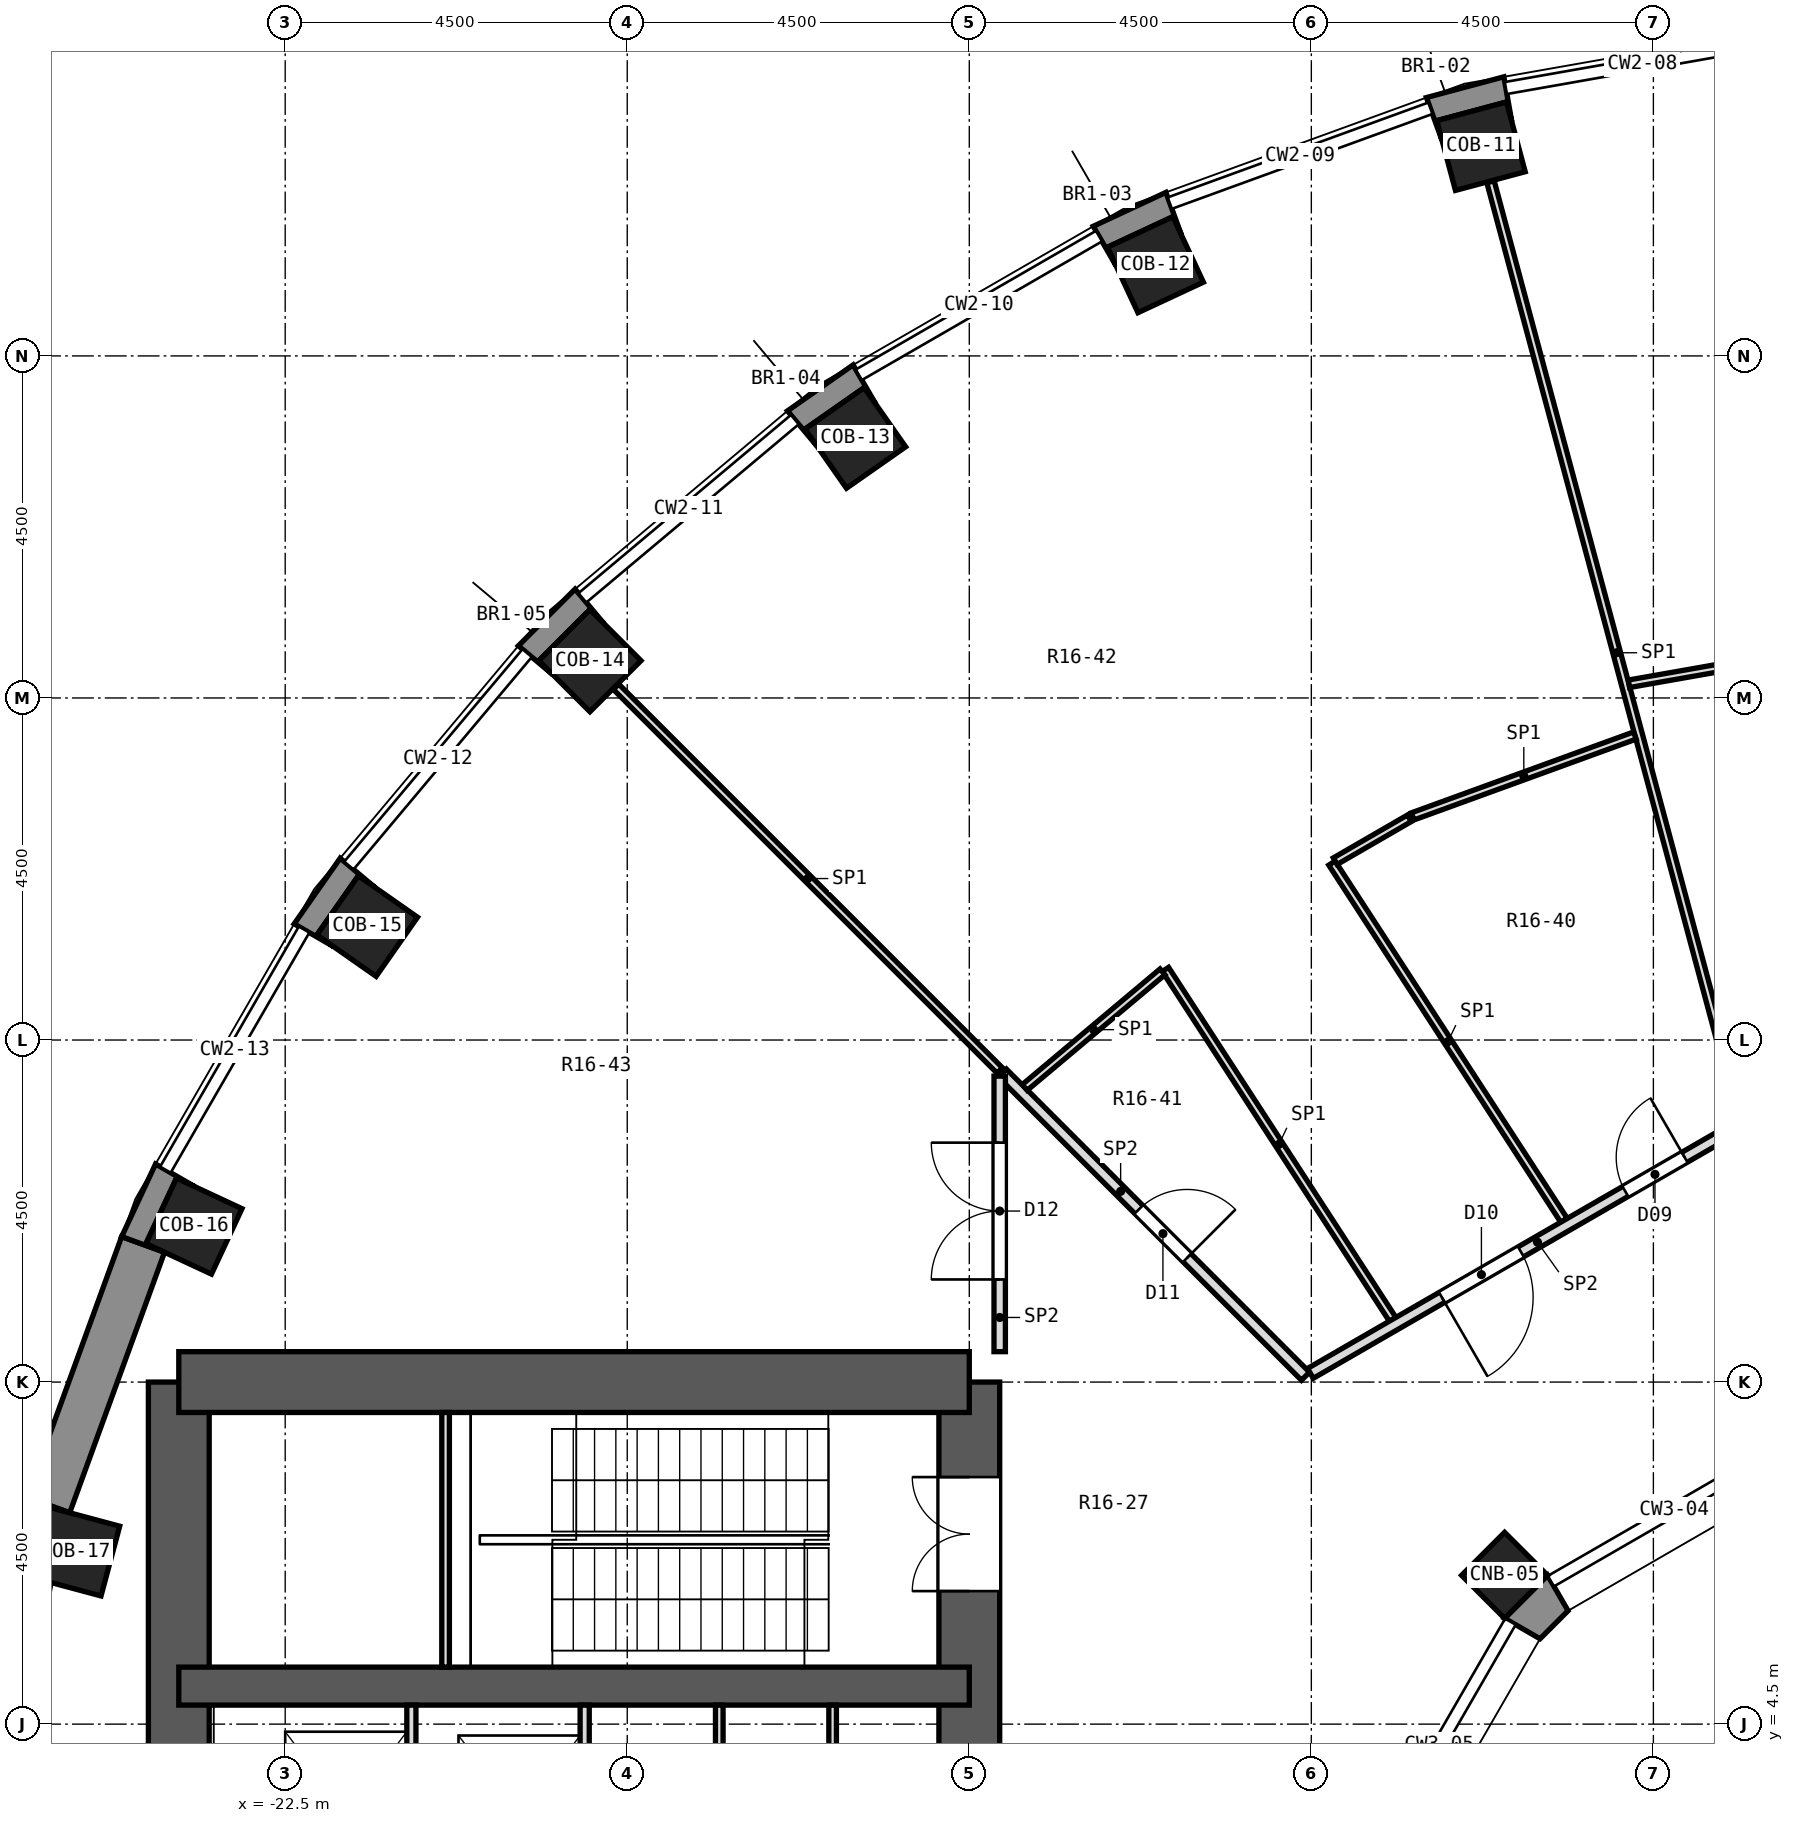
"""IFC4 building model, lengths in metres.
Left out: names, types, materials, properties, quantities, classifications, styles, units other than length and angle.
Written with IfcOpenShell. Run it as: python <this file> out.ifc"""

import sys

from ifc_helpers import new_model, si_unit, direction, frame, frame_2d, origin, origin_2d, place, context, subcontext, project, spatial, polyline, rectangle, outline, extrude, element, fill, save


model = new_model("IFC4")
c1 = context("Model", 3, precision=1e-05, world=origin(), true_north=direction((0.0, 1.0)))
c2 = subcontext(c1, "Body", "Model", "MODEL_VIEW")
j1 = project(units=[si_unit("LENGTHUNIT", "METRE"), si_unit("PLANEANGLEUNIT", "RADIAN")], contexts=[c1])
p1 = place(None, origin())
s1 = spatial("IfcSite", under=j1, at=p1, CompositionType="ELEMENT")
p2 = place(p1, origin())
s2 = spatial("IfcBuilding", under=s1, at=p2, CompositionType="ELEMENT")
p3 = place(p2, frame((0.0, 0.0, 86.9)))
s3 = spatial("IfcBuildingStorey", under=s2, at=p3, CompositionType="ELEMENT", Elevation=86.9)
for number, where, z_axis, x_axis in (
    (1, (-6.768, 25.259, -0.55), (0.0, 0.0, 1.0), (-0.259, 0.966, 0.0)),
    (2, (-11.052, 23.7, -0.55), (0.0, 0.0, 1.0), (-0.423, 0.906, 0.0)),
    (3, (-14.999, 21.421, -0.55), (0.0, 0.0, 1.0), (-0.574, 0.819, 0.0)),
    (4, (-18.491, 18.491, -0.55), (0.0, 0.0, 1.0), (-0.707, 0.707, 0.0)),
    (5, (-21.421, 14.999, -0.55), (0.0, 0.0, 1.0), (-0.819, 0.574, 0.0)),
    (6, (-23.7, 11.052, -0.55), (0.0, 0.0, 1.0), (-0.906, 0.423, 0.0)),
    (7, (-25.259, 6.768, -0.55), (0.0, 0.0, 1.0), (-0.966, 0.259, 0.0)),
):
    element("IfcColumn", number, at=place(p3, frame(where, z_axis=z_axis, x_axis=x_axis)), inside=s3, PredefinedType="COLUMN", context=c2, shape_type="SweptSolid", body=[
        extrude(rectangle(XDim=0.95, YDim=0.95, at=origin_2d()), origin(), (0.0, 0.0, 1.0), 5.55),
    ])
p4 = place(p3, frame((-6.458, 6.458, 0.0), z_axis=(0.0, 0.0, 1.0), x_axis=(-0.707106781187, 0.707106781187, 0.0)))
e8 = element("IfcColumn", 8, at=p4, inside=s3, PredefinedType="COLUMN", context=c2, shape_type="SweptSolid", body=[
    extrude(rectangle(XDim=0.8, YDim=0.8, at=origin_2d()), origin(), (0.0, 0.0, 1.0), 5.0),
])
p5 = place(p3, frame((-13.5, -9.0, 0.0), z_axis=(0.0, 0.0, 1.0), x_axis=(0.0, 1.0, 0.0)))
e9 = element("IfcWall", 9, at=p5, inside=s3, PredefinedType="SHEAR", context=c2, shape_type="SweptSolid", body=[
    extrude(rectangle(XDim=18.0, YDim=0.8, at=frame_2d((9.0, 0.0))), origin(), (0.0, 0.0, 1.0), 5.0),
])
p6 = place(p5, frame((15.25, 0.0, 0.0)))
e10 = element("IfcOpeningElement", 10, at=p6, cuts=e9, PredefinedType="OPENING", context=c2, shape_type="SweptSolid", body=[
    extrude(rectangle(XDim=1.5, YDim=2.1, at=frame_2d((0.75, 1.05))), frame((0.0, 0.412, 0.0), z_axis=(0.0, -1.0, 0.0), x_axis=(1.0, 0.0, 0.0)), (0.0, 0.0, 1.0), 0.824),
])
p7 = place(p5, frame((1.25, 0.0, 0.0)))
e11 = element("IfcOpeningElement", 11, at=p7, cuts=e9, PredefinedType="OPENING", context=c2, shape_type="SweptSolid", body=[
    extrude(rectangle(XDim=1.5, YDim=2.1, at=frame_2d((0.75, 1.05))), frame((0.0, 0.412, 0.0), z_axis=(0.0, -1.0, 0.0), x_axis=(1.0, 0.0, 0.0)), (0.0, 0.0, 1.0), 0.824),
])
p8 = place(p5, frame((7.5, 0.0, 0.0)))
e12 = element("IfcOpeningElement", 12, at=p8, cuts=e9, PredefinedType="OPENING", context=c2, shape_type="SweptSolid", body=[
    extrude(rectangle(XDim=3.0, YDim=2.4, at=frame_2d((1.5, 1.2))), frame((0.0, 0.412, 0.0), z_axis=(0.0, -1.0, 0.0), x_axis=(1.0, 0.0, 0.0)), (0.0, 0.0, 1.0), 0.824),
])
p9 = place(p3, frame((-23.9, -9.0, 0.0), z_axis=(0.0, 0.0, 1.0), x_axis=(0.0, 1.0, 0.0)))
e13 = element("IfcWall", 13, at=p9, inside=s3, PredefinedType="SHEAR", context=c2, shape_type="SweptSolid", body=[
    extrude(rectangle(XDim=18.0, YDim=0.8, at=frame_2d((9.0, 0.0))), origin(), (0.0, 0.0, 1.0), 5.0),
])
p10 = place(p3, frame((-13.5, 9.0, 0.0), z_axis=(0.0, 0.0, 1.0), x_axis=(-1.0, 0.0, 0.0)))
e14 = element("IfcWall", 14, at=p10, inside=s3, PredefinedType="SHEAR", context=c2, shape_type="SweptSolid", body=[
    extrude(rectangle(XDim=10.4, YDim=0.8, at=frame_2d((5.2, 0.0))), origin(), (0.0, 0.0, 1.0), 5.0),
])
p11 = place(p3, frame((-13.5, 5.0, 0.0), z_axis=(0.0, 0.0, 1.0), x_axis=(-1.0, 0.0, 0.0)))
e15 = element("IfcWall", 15, at=p11, inside=s3, PredefinedType="SHEAR", context=c2, shape_type="SweptSolid", body=[
    extrude(rectangle(XDim=10.4, YDim=0.5, at=frame_2d((5.2, 0.0))), origin(), (0.0, 0.0, 1.0), 5.0),
])
p12 = place(p3, frame((-24.369, 10.811, 0.0), z_axis=(0.0, 0.0, 1.0), x_axis=(-0.341990236633, -0.939703505393, 0.0)))
e16 = element("IfcWall", 16, at=p12, inside=s3, PredefinedType="SOLIDWALL", context=c2, shape_type="SweptSolid", body=[
    extrude(rectangle(XDim=3.648, YDim=0.6, at=frame_2d((1.824, 0.0))), origin(), (0.0, 0.0, 1.0), 4.5),
])
p13 = place(p3, origin())
e17 = element("IfcWall", 17, at=p13, inside=s3, PredefinedType="SOLIDWALL", context=c2, shape_type="SweptSolid", body=[
    extrude(outline(polyline([(-6.467, 26.172), (-7.486, 25.899), (-7.28, 25.335), (-7.35, 25.595), (-6.432, 25.841), (-6.363, 25.581), (-6.467, 26.172)])), origin(), (0.0, 0.0, 1.0), 4.5),
])
p14 = place(p3, origin())
e18 = element("IfcWall", 18, at=p14, inside=s3, PredefinedType="SOLIDWALL", context=c2, shape_type="SweptSolid", body=[
    extrude(outline(polyline([(-10.913, 24.651), (-11.869, 24.206), (-11.569, 23.686), (-11.683, 23.93), (-10.822, 24.331), (-10.708, 24.087), (-10.913, 24.651)])), origin(), (0.0, 0.0, 1.0), 4.5),
])
p15 = place(p3, origin())
e19 = element("IfcWall", 19, at=p15, inside=s3, PredefinedType="SOLIDWALL", context=c2, shape_type="SweptSolid", body=[
    extrude(outline(polyline([(-15.892, 21.777), (-15.506, 21.317), (-15.661, 21.538), (-14.882, 22.083), (-14.728, 21.862), (-15.028, 22.382), (-15.892, 21.777)])), origin(), (0.0, 0.0, 1.0), 4.5),
])
p16 = place(p3, origin())
e20 = element("IfcWall", 20, at=p16, inside=s3, PredefinedType="SOLIDWALL", context=c2, shape_type="SweptSolid", body=[
    extrude(outline(polyline([(-18.686, 19.432), (-19.432, 18.686), (-18.972, 18.301), (-19.163, 18.491), (-18.491, 19.163), (-18.301, 18.972), (-18.686, 19.432)])), origin(), (0.0, 0.0, 1.0), 4.5),
])
p17 = place(p3, origin())
e21 = element("IfcWall", 21, at=p17, inside=s3, PredefinedType="SOLIDWALL", context=c2, shape_type="SweptSolid", body=[
    extrude(outline(polyline([(-22.382, 15.028), (-21.862, 14.728), (-22.083, 14.882), (-21.538, 15.661), (-21.317, 15.506), (-21.777, 15.892), (-22.382, 15.028)])), origin(), (0.0, 0.0, 1.0), 4.5),
])
p18 = place(p3, origin())
e22 = element("IfcWall", 22, at=p18, inside=s3, PredefinedType="SOLIDWALL", context=c2, shape_type="SweptSolid", body=[
    extrude(outline(polyline([(-24.651, 10.913), (-24.087, 10.708), (-24.331, 10.822), (-23.93, 11.683), (-23.686, 11.569), (-24.206, 11.869), (-24.651, 10.913)])), origin(), (0.0, 0.0, 1.0), 4.5),
])
p19 = place(p3, origin())
e23 = element("IfcWall", 23, at=p19, inside=s3, PredefinedType="SOLIDWALL", context=c2, shape_type="SweptSolid", body=[
    extrude(outline(polyline([(-25.899, 7.486), (-26.172, 6.467), (-25.581, 6.363), (-25.841, 6.432), (-25.595, 7.35), (-25.335, 7.28), (-25.899, 7.486)])), origin(), (0.0, 0.0, 1.0), 4.5),
])
p20 = place(p3, origin())
e24 = element("IfcWall", 24, at=p20, inside=s3, PredefinedType="SOLIDWALL", context=c2, shape_type="SweptSolid", body=[
    extrude(outline(polyline([(-6.458, 5.892), (-5.991, 5.623), (-5.623, 5.991), (-5.892, 6.458), (-6.458, 5.892)])), origin(), (0.0, 0.0, 1.0), 4.5),
])
p21 = place(p3, frame((-6.643, 24.791, 0.0), z_axis=(0.0, 0.0, 1.0), x_axis=(0.258784286108, -0.965935139263, 0.0)))
e25 = element("IfcWall", 25, at=p21, inside=s3, PredefinedType="PARTITIONING", context=c2, shape_type="SweptSolid", body=[
    extrude(rectangle(XDim=12.828, YDim=0.1, at=frame_2d((6.414, 0.0))), origin(), (0.0, 0.0, 1.0), 4.5),
])
p22 = place(p3, frame((-10.92, 14.429, 0.0), z_axis=(0.0, 0.0, 1.0), x_axis=(0.54460991282, -0.838689479401, 0.0)))
e26 = element("IfcWall", 26, at=p22, inside=s3, PredefinedType="PARTITIONING", context=c2, shape_type="SweptSolid", body=[
    extrude(rectangle(XDim=5.488, YDim=0.1, at=frame_2d((2.744, 0.0))), origin(), (0.0, 0.0, 1.0), 4.5),
])
p23 = place(p3, frame((-8.729, 15.828, 0.0), z_axis=(0.0, 0.0, 1.0), x_axis=(0.544769380459, -0.838585906222, 0.0)))
e27 = element("IfcWall", 27, at=p23, inside=s3, PredefinedType="PARTITIONING", context=c2, shape_type="SweptSolid", body=[
    extrude(rectangle(XDim=5.605, YDim=0.1, at=frame_2d((2.802, 0.0))), origin(), (0.0, 0.0, 1.0), 4.5),
])
p24 = place(p3, frame((-18.148, 18.148, 0.0), z_axis=(0.0, 0.0, 1.0), x_axis=(0.707106781187, -0.707106781187, 0.0)))
e28 = element("IfcWall", 28, at=p24, inside=s3, PredefinedType="PARTITIONING", context=c2, shape_type="SweptSolid", body=[
    extrude(rectangle(XDim=7.139, YDim=0.1, at=frame_2d((3.569, 0.0))), origin(), (0.0, 0.0, 1.0), 4.5),
])
p25 = place(p3, frame((-13.065, 13.065, 0.0), z_axis=(0.0, 0.0, 1.0), x_axis=(0.707106781187, -0.707106781187, 0.0)))
e29 = element("IfcWall", 29, at=p25, inside=s3, PredefinedType="PARTITIONING", context=c2, shape_type="SweptSolid", body=[
    extrude(rectangle(XDim=5.64, YDim=0.15, at=frame_2d((2.82, 0.0))), origin(), (0.0, 0.0, 1.0), 4.5),
])
p26 = place(p25, frame((2.537, 0.0, 0.0)))
e30 = element("IfcOpeningElement", 30, at=p26, cuts=e29, PredefinedType="OPENING", context=c2, shape_type="SweptSolid", body=[
    extrude(rectangle(XDim=0.9, YDim=2.1, at=frame_2d((0.45, 1.05))), frame((0.0, 0.087, 0.0), z_axis=(0.0, -1.0, 0.0), x_axis=(1.0, 0.0, 0.0)), (0.0, 0.0, 1.0), 0.174),
])
p27 = place(p3, frame((-4.822, 18.187, 0.0), z_axis=(0.0, 0.0, 1.0), x_axis=(0.984847393416, 0.173423215521, 0.0)))
e31 = element("IfcWall", 31, at=p27, inside=s3, PredefinedType="PARTITIONING", context=c2, shape_type="SweptSolid", body=[
    extrude(rectangle(XDim=3.231, YDim=0.1, at=frame_2d((1.615, 0.0))), origin(), (0.0, 0.0, 1.0), 4.5),
])
p28 = place(p3, frame((-7.667, 16.442, 0.0), z_axis=(0.0, 0.0, 1.0), x_axis=(0.93972467972, 0.34193204928, 0.0)))
e32 = element("IfcWall", 32, at=p28, inside=s3, PredefinedType="PARTITIONING", context=c2, shape_type="SweptSolid", body=[
    extrude(rectangle(XDim=3.112, YDim=0.1, at=frame_2d((1.556, 0.0))), origin(), (0.0, 0.0, 1.0), 4.5),
])
p29 = place(p3, frame((-9.012, 9.115, 0.0), z_axis=(0.0, 0.0, 1.0), x_axis=(0.865967095912, 0.5001009786, 0.0)))
e33 = element("IfcWall", 33, at=p29, inside=s3, PredefinedType="PARTITIONING", context=c2, shape_type="SweptSolid", body=[
    extrude(rectangle(XDim=6.495, YDim=0.15, at=frame_2d((3.248, 0.0))), origin(), (0.0, 0.0, 1.0), 4.5),
])
p30 = place(p29, frame((4.785, 0.0, 0.0)))
e34 = element("IfcOpeningElement", 34, at=p30, cuts=e33, PredefinedType="OPENING", context=c2, shape_type="SweptSolid", body=[
    extrude(rectangle(XDim=0.9, YDim=2.1, at=frame_2d((0.45, 1.05))), frame((0.0, 0.087, 0.0), z_axis=(0.0, -1.0, 0.0), x_axis=(1.0, 0.0, 0.0)), (0.0, 0.0, 1.0), 0.174),
])
p31 = place(p29, frame((1.998, 0.0, 0.0)))
e35 = element("IfcOpeningElement", 35, at=p31, cuts=e33, PredefinedType="OPENING", context=c2, shape_type="SweptSolid", body=[
    extrude(rectangle(XDim=1.2, YDim=2.1, at=frame_2d((0.6, 1.05))), frame((0.0, 0.087, 0.0), z_axis=(0.0, -1.0, 0.0), x_axis=(1.0, 0.0, 0.0)), (0.0, 0.0, 1.0), 0.174),
])
p32 = place(p3, frame((-8.686, 15.853, 0.0), z_axis=(0.0, 0.0, 1.0), x_axis=(0.865752432539, 0.500472502294, 0.0)))
e36 = element("IfcWall", 36, at=p32, inside=s3, PredefinedType="PARTITIONING", context=c2, shape_type="SweptSolid", body=[
    extrude(rectangle(XDim=1.127, YDim=0.1, at=frame_2d((0.563, 0.0))), origin(), (0.0, 0.0, 1.0), 4.5),
])
p33 = place(p3, frame((-12.771, 12.876, 0.0), z_axis=(0.0, 0.0, 1.0), x_axis=(0.766025974986, 0.642809618508, 0.0)))
e37 = element("IfcWall", 37, at=p33, inside=s3, PredefinedType="PARTITIONING", context=c2, shape_type="SweptSolid", body=[
    extrude(rectangle(XDim=2.366, YDim=0.1, at=frame_2d((1.183, 0.0))), origin(), (0.0, 0.0, 1.0), 4.5),
])
p34 = place(p3, frame((-13.1, 9.4, 0.0), z_axis=(0.0, 0.0, 1.0), x_axis=(0.0, 1.0, 0.0)))
e38 = element("IfcWall", 38, at=p34, inside=s3, PredefinedType="PARTITIONING", context=c2, shape_type="SweptSolid", body=[
    extrude(rectangle(XDim=3.625, YDim=0.15, at=frame_2d((1.812, 0.0))), origin(), (0.0, 0.0, 1.0), 4.5),
])
p35 = place(p34, frame((0.95, 0.0, 0.0)))
e39 = element("IfcOpeningElement", 39, at=p35, cuts=e38, PredefinedType="OPENING", context=c2, shape_type="SweptSolid", body=[
    extrude(rectangle(XDim=1.8, YDim=2.1, at=frame_2d((0.9, 1.05))), frame((0.0, 0.087, 0.0), z_axis=(0.0, -1.0, 0.0), x_axis=(1.0, 0.0, 0.0)), (0.0, 0.0, 1.0), 0.174),
])
for number, where, z_axis, x_axis in (
    (40, (-15.298, 2.25, 0.0), (0.0, 0.0, 1.0), (0.0, 1.0, 0.0)),
    (41, (-16.789, 2.25, 0.0), (0.0, 0.0, 1.0), (0.0, 1.0, 0.0)),
):
    element("IfcWall", number, at=place(p3, frame(where, z_axis=z_axis, x_axis=x_axis)), inside=s3, PredefinedType="PARTITIONING", context=c2, shape_type="SweptSolid", body=[
        extrude(rectangle(XDim=2.5, YDim=0.1, at=frame_2d((1.25, 0.0))), origin(), (0.0, 0.0, 1.0), 4.5),
    ])
for number, where, z_axis, x_axis in (
    (42, (-18.56, 2.25, 0.0), (0.0, 0.0, 1.0), (0.0, 1.0, 0.0)),
    (43, (-20.84, 2.25, 0.0), (0.0, 0.0, 1.0), (0.0, 1.0, 0.0)),
):
    element("IfcWall", number, at=place(p3, frame(where, z_axis=z_axis, x_axis=x_axis)), inside=s3, PredefinedType="PARTITIONING", context=c2, shape_type="SweptSolid", body=[
        extrude(rectangle(XDim=2.5, YDim=0.12, at=frame_2d((1.25, 0.0))), origin(), (0.0, 0.0, 1.0), 4.5),
    ])
p36 = place(p3, frame((-20.39, 5.25, 0.0), z_axis=(0.0, 0.0, 1.0), x_axis=(0.0, 1.0, 0.0)))
e44 = element("IfcWall", 44, at=p36, inside=s3, PredefinedType="PARTITIONING", context=c2, shape_type="SweptSolid", body=[
    extrude(rectangle(XDim=3.35, YDim=0.1, at=frame_2d((1.675, 0.0))), origin(), (0.0, 0.0, 1.0), 4.5),
])
p37 = place(p30, origin())
e45 = element("IfcDoor", 45, at=p37, inside=s3, OperationType="SINGLE_SWING_RIGHT", PredefinedType="DOOR", context=c2, shape_type="SweptSolid", body=[
    extrude(rectangle(XDim=0.9, YDim=2.1, at=frame_2d((0.45, 1.05))), frame((0.0, 0.025, 0.0), z_axis=(0.0, -1.0, 0.0), x_axis=(1.0, 0.0, 0.0)), (0.0, 0.0, 1.0), 0.05),
])
fill(e34, e45)
p38 = place(p31, frame((1.2, 0.0, 0.0), z_axis=(0.0, 0.0, 1.0), x_axis=(-1.0, 0.0, 0.0)))
e46 = element("IfcDoor", 46, at=p38, inside=s3, OperationType="SINGLE_SWING_RIGHT", PredefinedType="DOOR", context=c2, shape_type="SweptSolid", body=[
    extrude(rectangle(XDim=1.2, YDim=2.1, at=frame_2d((0.6, 1.05))), frame((0.0, 0.025, 0.0), z_axis=(0.0, -1.0, 0.0), x_axis=(1.0, 0.0, 0.0)), (0.0, 0.0, 1.0), 0.05),
])
fill(e35, e46)
p39 = place(p26, origin())
e47 = element("IfcDoor", 47, at=p39, inside=s3, OperationType="SINGLE_SWING_RIGHT", PredefinedType="DOOR", context=c2, shape_type="SweptSolid", body=[
    extrude(rectangle(XDim=0.9, YDim=2.1, at=frame_2d((0.45, 1.05))), frame((0.0, 0.025, 0.0), z_axis=(0.0, -1.0, 0.0), x_axis=(1.0, 0.0, 0.0)), (0.0, 0.0, 1.0), 0.05),
])
fill(e30, e47)
p40 = place(p35, origin())
e48 = element("IfcDoor", 48, at=p40, inside=s3, OperationType="DOUBLE_DOOR_SINGLE_SWING", PredefinedType="DOOR", context=c2, shape_type="SweptSolid", body=[
    extrude(rectangle(XDim=1.8, YDim=2.1, at=frame_2d((0.9, 1.05))), frame((0.0, 0.025, 0.0), z_axis=(0.0, -1.0, 0.0), x_axis=(1.0, 0.0, 0.0)), (0.0, 0.0, 1.0), 0.05),
])
fill(e39, e48)
p41 = place(p6, origin())
e49 = element("IfcDoor", 49, at=p41, inside=s3, OperationType="DOUBLE_DOOR_SINGLE_SWING", PredefinedType="DOOR", context=c2, shape_type="SweptSolid", body=[
    extrude(rectangle(XDim=1.5, YDim=2.1, at=frame_2d((0.75, 1.05))), frame((0.0, 0.025, 0.0), z_axis=(0.0, -1.0, 0.0), x_axis=(1.0, 0.0, 0.0)), (0.0, 0.0, 1.0), 0.05),
])
fill(e10, e49)
save(model, sys.argv[1])
